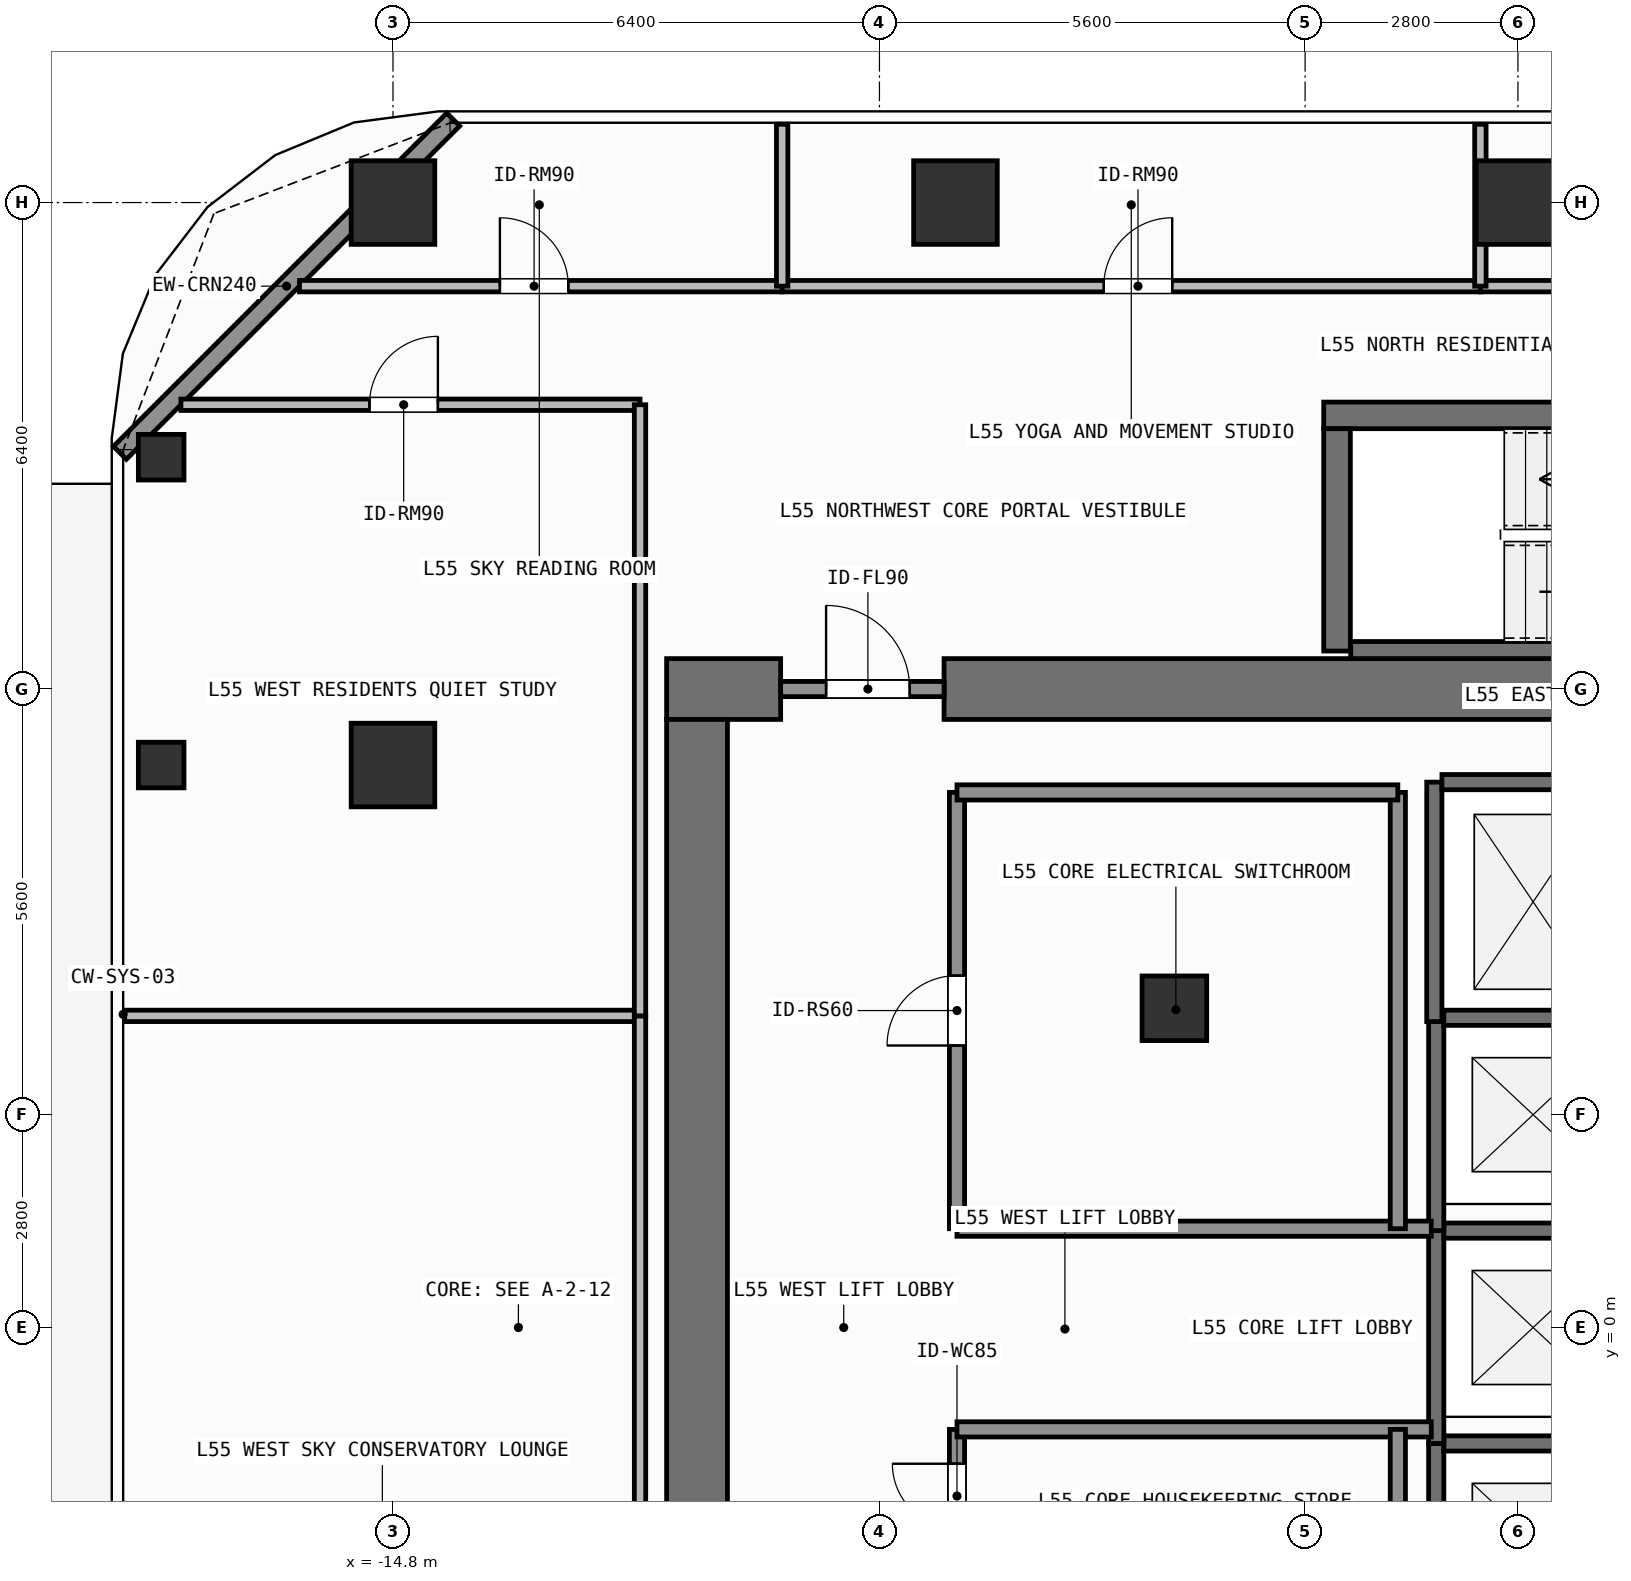
"""IFC4 building model, lengths in metres.
Left out: names, types, materials, properties, quantities, classifications, styles, units other than length and angle.
Written with IfcOpenShell. Run it as: python <this file> out.ifc"""

import sys

from ifc_helpers import new_model, si_unit, direction, frame, frame_2d, origin, origin_2d, place, context, subcontext, project, spatial, rectangle, hollow_rectangle, extrude, element, fill, save


model = new_model("IFC4")
c1 = context("Model", 3, precision=1e-05, world=origin(), true_north=direction((0.0, 1.0)))
c2 = subcontext(c1, "Body", "Model", "MODEL_VIEW")
j1 = project(units=[si_unit("LENGTHUNIT", "METRE"), si_unit("PLANEANGLEUNIT", "RADIAN")], contexts=[c1])
p1 = place(None, origin())
s1 = spatial("IfcSite", under=j1, at=p1, CompositionType="ELEMENT")
p2 = place(p1, origin())
s2 = spatial("IfcBuilding", under=s1, at=p2, CompositionType="ELEMENT")
p3 = place(p2, frame((0.0, 0.0, 223.5)))
s3 = spatial("IfcBuildingStorey", under=s2, at=p3, CompositionType="ELEMENT", Elevation=223.5)
p4 = place(p3, frame((-11.2, 8.4, 0.0), z_axis=(0.0, 0.0, 1.0), x_axis=(1.0, 0.0, 0.0)))
e1 = element("IfcWall", 1, at=p4, inside=s3, PredefinedType="SHEAR", context=c2, shape_type="SweptSolid", body=[
    extrude(rectangle(XDim=1.5, YDim=0.8, at=frame_2d((0.75, 0.0))), origin(), (0.0, 0.0, 1.0), 3.9),
])
p5 = place(p3, frame((-7.55, 8.4, 0.0), z_axis=(0.0, 0.0, 1.0), x_axis=(1.0, 0.0, 0.0)))
e2 = element("IfcWall", 2, at=p5, inside=s3, PredefinedType="SHEAR", context=c2, shape_type="SweptSolid", body=[
    extrude(rectangle(XDim=16.35, YDim=0.8, at=frame_2d((8.175, 0.0))), origin(), (0.0, 0.0, 1.0), 3.9),
])
p6 = place(p3, frame((-10.8, -8.0, 0.0), z_axis=(0.0, 0.0, 1.0), x_axis=(0.0, 1.0, 0.0)))
e3 = element("IfcWall", 3, at=p6, inside=s3, PredefinedType="SHEAR", context=c2, shape_type="SweptSolid", body=[
    extrude(rectangle(XDim=16.0, YDim=0.8, at=frame_2d((8.0, 0.0))), origin(), (0.0, 0.0, 1.0), 3.9),
])
p7 = place(p3, frame((-2.555, 12.0, 0.0), z_axis=(0.0, 0.0, 1.0), x_axis=(1.0, 0.0, 0.0)))
e4 = element("IfcWall", 4, at=p7, inside=s3, PredefinedType="SHEAR", context=c2, shape_type="SweptSolid", body=[
    extrude(rectangle(XDim=7.31, YDim=0.35, at=frame_2d((3.655, 0.0))), origin(), (0.0, 0.0, 1.0), 3.9),
])
p8 = place(p3, frame((-2.2, 8.913, 0.0), z_axis=(0.0, 0.0, 1.0), x_axis=(1.0, 0.0, 0.0)))
e5 = element("IfcWall", 5, at=p8, inside=s3, PredefinedType="SHEAR", context=c2, shape_type="SweptSolid", body=[
    extrude(rectangle(XDim=6.6, YDim=0.225, at=frame_2d((3.3, 0.0))), origin(), (0.0, 0.0, 1.0), 3.9),
])
p9 = place(p3, frame((-2.38, 8.9, 0.0), z_axis=(0.0, 0.0, 1.0), x_axis=(0.0, 1.0, 0.0)))
e6 = element("IfcWall", 6, at=p9, inside=s3, PredefinedType="SHEAR", context=c2, shape_type="SweptSolid", body=[
    extrude(rectangle(XDim=2.925, YDim=0.35, at=frame_2d((1.462, 0.0))), origin(), (0.0, 0.0, 1.0), 3.9),
])
for number, where, z_axis, x_axis in (
    (7, (-14.8, 14.8, 0.0), (0.0, 0.0, 1.0), (1.0, 0.0, 0.0)),
    (8, (-7.4, 14.8, 0.0), (0.0, 0.0, 1.0), (1.0, 0.0, 0.0)),
    (9, (0.0, 14.8, 0.0), (0.0, 0.0, 1.0), (1.0, 0.0, 0.0)),
    (10, (-14.8, 7.4, 0.0), (0.0, 0.0, 1.0), (1.0, 0.0, 0.0)),
):
    element("IfcColumn", number, at=place(p3, frame(where, z_axis=z_axis, x_axis=x_axis)), inside=s3, PredefinedType="COLUMN", context=c2, shape_type="SweptSolid", body=[
        extrude(rectangle(XDim=1.1, YDim=1.1, at=origin_2d()), origin(), (0.0, 0.0, 1.0), 3.9),
    ])
p10 = place(p3, frame((-4.52, 4.2, 0.0), z_axis=(0.0, 0.0, 1.0), x_axis=(1.0, 0.0, 0.0)))
e11 = element("IfcColumn", 11, at=p10, inside=s3, PredefinedType="COLUMN", context=c2, shape_type="SweptSolid", body=[
    extrude(rectangle(XDim=0.85, YDim=0.85, at=origin_2d()), origin(), (0.0, 0.0, 1.0), 3.9),
])
for number, where, z_axis, x_axis in (
    (12, (-17.85, 11.45, 0.0), (0.0, 0.0, 1.0), (1.0, 0.0, 0.0)),
    (13, (-17.85, 7.4, 0.0), (0.0, 0.0, 1.0), (1.0, 0.0, 0.0)),
):
    element("IfcColumn", number, at=place(p3, frame(where, z_axis=z_axis, x_axis=x_axis)), inside=s3, PredefinedType="COLUMN", context=c2, shape_type="SweptSolid", body=[
        extrude(hollow_rectangle(XDim=0.6, YDim=0.6, WallThickness=0.028, at=origin_2d()), origin(), (0.0, 0.0, 1.0), 3.9),
    ])
p11 = place(p3, frame((-18.392, 11.508, 0.0), z_axis=(0.0, 0.0, 1.0), x_axis=(0.707106781187, 0.707106781187, 0.0)))
e14 = element("IfcWall", 14, at=p11, inside=s3, PredefinedType="SOLIDWALL", context=c2, shape_type="SweptSolid", body=[
    extrude(rectangle(XDim=6.201, YDim=0.24, at=frame_2d((3.101, 0.0))), origin(), (0.0, 0.0, 1.0), 3.68),
])
p12 = place(p3, frame((-1.075, -4.275, 0.0), z_axis=(0.0, 0.0, 1.0), x_axis=(0.0, 1.0, 0.0)))
e15 = element("IfcWall", 15, at=p12, inside=s3, PredefinedType="SHEAR", context=c2, shape_type="SweptSolid", body=[
    extrude(rectangle(XDim=2.75, YDim=0.2, at=frame_2d((1.375, 0.0))), origin(), (0.0, 0.0, 1.0), 3.68),
])
p13 = place(p3, frame((-0.975, -1.525, 0.0), z_axis=(0.0, 0.0, 1.0), x_axis=(1.0, 0.0, 0.0)))
e16 = element("IfcWall", 16, at=p13, inside=s3, PredefinedType="SHEAR", context=c2, shape_type="SweptSolid", body=[
    extrude(rectangle(XDim=2.35, YDim=0.2, at=frame_2d((1.175, 0.0))), origin(), (0.0, 0.0, 1.0), 3.68),
])
p14 = place(p3, frame((-1.075, -1.525, 0.0), z_axis=(0.0, 0.0, 1.0), x_axis=(0.0, 1.0, 0.0)))
e17 = element("IfcWall", 17, at=p14, inside=s3, PredefinedType="SHEAR", context=c2, shape_type="SweptSolid", body=[
    extrude(rectangle(XDim=2.8, YDim=0.2, at=frame_2d((1.4, 0.0))), origin(), (0.0, 0.0, 1.0), 3.68),
])
p15 = place(p3, frame((-0.975, 1.275, 0.0), z_axis=(0.0, 0.0, 1.0), x_axis=(1.0, 0.0, 0.0)))
e18 = element("IfcWall", 18, at=p15, inside=s3, PredefinedType="SHEAR", context=c2, shape_type="SweptSolid", body=[
    extrude(rectangle(XDim=2.35, YDim=0.2, at=frame_2d((1.175, 0.0))), origin(), (0.0, 0.0, 1.0), 3.68),
])
p16 = place(p3, frame((-1.075, 1.275, 0.0), z_axis=(0.0, 0.0, 1.0), x_axis=(0.0, 1.0, 0.0)))
e19 = element("IfcWall", 19, at=p16, inside=s3, PredefinedType="SHEAR", context=c2, shape_type="SweptSolid", body=[
    extrude(rectangle(XDim=2.8, YDim=0.2, at=frame_2d((1.4, 0.0))), origin(), (0.0, 0.0, 1.0), 3.68),
])
p17 = place(p3, frame((-0.975, 4.075, 0.0), z_axis=(0.0, 0.0, 1.0), x_axis=(1.0, 0.0, 0.0)))
e20 = element("IfcWall", 20, at=p17, inside=s3, PredefinedType="SHEAR", context=c2, shape_type="SweptSolid", body=[
    extrude(rectangle(XDim=2.35, YDim=0.2, at=frame_2d((1.175, 0.0))), origin(), (0.0, 0.0, 1.0), 3.68),
])
p18 = place(p3, frame((-1.1, 4.025, 0.0), z_axis=(0.0, 0.0, 1.0), x_axis=(0.0, 1.0, 0.0)))
e21 = element("IfcWall", 21, at=p18, inside=s3, PredefinedType="SHEAR", context=c2, shape_type="SweptSolid", body=[
    extrude(rectangle(XDim=3.15, YDim=0.2, at=frame_2d((1.575, 0.0))), origin(), (0.0, 0.0, 1.0), 3.68),
])
p19 = place(p3, frame((-1.0, 7.175, 0.0), z_axis=(0.0, 0.0, 1.0), x_axis=(1.0, 0.0, 0.0)))
e22 = element("IfcWall", 22, at=p19, inside=s3, PredefinedType="SHEAR", context=c2, shape_type="SweptSolid", body=[
    extrude(rectangle(XDim=2.4, YDim=0.2, at=frame_2d((1.2, 0.0))), origin(), (0.0, 0.0, 1.0), 3.68),
])
p20 = place(p3, frame((-9.7, 8.4, 0.0), z_axis=(0.0, 0.0, 1.0), x_axis=(1.0, 0.0, 0.0)))
e23 = element("IfcWall", 23, at=p20, inside=s3, PredefinedType="SOLIDWALL", context=c2, shape_type="SweptSolid", body=[
    extrude(rectangle(XDim=2.15, YDim=0.2, at=frame_2d((1.075, 0.0))), origin(), (0.0, 0.0, 1.0), 2.82),
])
p21 = place(p20, frame((0.598, 0.0, 0.0)))
e24 = element("IfcOpeningElement", 24, at=p21, cuts=e23, PredefinedType="OPENING", context=c2, shape_type="SweptSolid", body=[
    extrude(rectangle(XDim=1.1, YDim=2.15, at=frame_2d((0.55, 1.075))), frame((0.0, 0.11, 0.0), z_axis=(0.0, -1.0, 0.0), x_axis=(1.0, 0.0, 0.0)), (0.0, 0.0, 1.0), 0.22),
])
p22 = place(p3, frame((-7.38, -3.24, 0.0), z_axis=(0.0, 0.0, 1.0), x_axis=(0.0, 1.0, 0.0)))
e25 = element("IfcWall", 25, at=p22, inside=s3, PredefinedType="SOLIDWALL", context=c2, shape_type="SweptSolid", body=[
    extrude(rectangle(XDim=1.9, YDim=0.2, at=frame_2d((0.95, 0.0))), origin(), (0.0, 0.0, 1.0), 3.68),
])
p23 = place(p22, frame((0.598, 0.0, 0.0)))
e26 = element("IfcOpeningElement", 26, at=p23, cuts=e25, PredefinedType="OPENING", context=c2, shape_type="SweptSolid", body=[
    extrude(rectangle(XDim=0.85, YDim=2.1, at=frame_2d((0.425, 1.05))), frame((0.0, 0.11, 0.0), z_axis=(0.0, -1.0, 0.0), x_axis=(1.0, 0.0, 0.0)), (0.0, 0.0, 1.0), 0.22),
])
p24 = place(p3, frame((-7.38, 1.3, 0.0), z_axis=(0.0, 0.0, 1.0), x_axis=(0.0, 1.0, 0.0)))
e27 = element("IfcWall", 27, at=p24, inside=s3, PredefinedType="SOLIDWALL", context=c2, shape_type="SweptSolid", body=[
    extrude(rectangle(XDim=5.74, YDim=0.2, at=frame_2d((2.87, 0.0))), origin(), (0.0, 0.0, 1.0), 3.68),
])
p25 = place(p24, frame((2.41, 0.0, 0.0)))
e28 = element("IfcOpeningElement", 28, at=p25, cuts=e27, PredefinedType="OPENING", context=c2, shape_type="SweptSolid", body=[
    extrude(rectangle(XDim=0.92, YDim=2.1, at=frame_2d((0.46, 1.05))), frame((0.0, 0.11, 0.0), z_axis=(0.0, -1.0, 0.0), x_axis=(1.0, 0.0, 0.0)), (0.0, 0.0, 1.0), 0.22),
])
p26 = place(p3, frame((-16.03, 13.7, 0.0), z_axis=(0.0, 0.0, 1.0), x_axis=(1.0, 0.0, 0.0)))
e29 = element("IfcWall", 29, at=p26, inside=s3, PredefinedType="PARTITIONING", context=c2, shape_type="SweptSolid", body=[
    extrude(rectangle(XDim=6.35, YDim=0.15, at=frame_2d((3.175, 0.0))), origin(), (0.0, 0.0, 1.0), 3.68),
])
p27 = place(p26, frame((2.637, 0.0, 0.0)))
e30 = element("IfcOpeningElement", 30, at=p27, cuts=e29, PredefinedType="OPENING", context=c2, shape_type="SweptSolid", body=[
    extrude(rectangle(XDim=0.9, YDim=2.1, at=frame_2d((0.45, 1.05))), frame((0.0, 0.085, 0.0), z_axis=(0.0, -1.0, 0.0), x_axis=(1.0, 0.0, 0.0)), (0.0, 0.0, 1.0), 0.17),
])
p28 = place(p3, frame((-9.68, 13.7, 0.0), z_axis=(0.0, 0.0, 1.0), x_axis=(1.0, 0.0, 0.0)))
e31 = element("IfcWall", 31, at=p28, inside=s3, PredefinedType="PARTITIONING", context=c2, shape_type="SweptSolid", body=[
    extrude(rectangle(XDim=9.186, YDim=0.15, at=frame_2d((4.593, 0.0))), origin(), (0.0, 0.0, 1.0), 3.68),
])
p29 = place(p28, frame((4.231, 0.0, 0.0)))
e32 = element("IfcOpeningElement", 32, at=p29, cuts=e31, PredefinedType="OPENING", context=c2, shape_type="SweptSolid", body=[
    extrude(rectangle(XDim=0.9, YDim=2.1, at=frame_2d((0.45, 1.05))), frame((0.0, 0.085, 0.0), z_axis=(0.0, -1.0, 0.0), x_axis=(1.0, 0.0, 0.0)), (0.0, 0.0, 1.0), 0.17),
])
p30 = place(p3, frame((-0.494, 13.7, 0.0), z_axis=(0.0, 0.0, 1.0), x_axis=(1.0, 0.0, 0.0)))
e33 = element("IfcWall", 33, at=p30, inside=s3, PredefinedType="PARTITIONING", context=c2, shape_type="SweptSolid", body=[
    extrude(rectangle(XDim=11.583, YDim=0.15, at=frame_2d((5.792, 0.0))), origin(), (0.0, 0.0, 1.0), 3.68),
])
p31 = place(p30, frame((5.342, 0.0, 0.0)))
e34 = element("IfcOpeningElement", 34, at=p31, cuts=e33, PredefinedType="OPENING", context=c2, shape_type="SweptSolid", body=[
    extrude(rectangle(XDim=0.9, YDim=2.1, at=frame_2d((0.45, 1.05))), frame((0.0, 0.085, 0.0), z_axis=(0.0, -1.0, 0.0), x_axis=(1.0, 0.0, 0.0)), (0.0, 0.0, 1.0), 0.17),
])
p32 = place(p3, frame((-17.59, 12.14, 0.0), z_axis=(0.0, 0.0, 1.0), x_axis=(1.0, 0.0, 0.0)))
e35 = element("IfcWall", 35, at=p32, inside=s3, PredefinedType="PARTITIONING", context=c2, shape_type="SweptSolid", body=[
    extrude(rectangle(XDim=6.04, YDim=0.15, at=frame_2d((3.02, 0.0))), origin(), (0.0, 0.0, 1.0), 3.68),
])
p33 = place(p32, frame((2.481, 0.0, 0.0)))
e36 = element("IfcOpeningElement", 36, at=p33, cuts=e35, PredefinedType="OPENING", context=c2, shape_type="SweptSolid", body=[
    extrude(rectangle(XDim=0.9, YDim=2.1, at=frame_2d((0.45, 1.05))), frame((0.0, 0.085, 0.0), z_axis=(0.0, -1.0, 0.0), x_axis=(1.0, 0.0, 0.0)), (0.0, 0.0, 1.0), 0.17),
])
for number, where, z_axis, x_axis in (
    (37, (-7.38, -1.34, 0.0), (0.0, 0.0, 1.0), (1.0, 0.0, 0.0)),
    (38, (-7.38, 1.3, 0.0), (0.0, 0.0, 1.0), (1.0, 0.0, 0.0)),
):
    element("IfcWall", number, at=place(p3, frame(where, z_axis=z_axis, x_axis=x_axis)), inside=s3, PredefinedType="SOLIDWALL", context=c2, shape_type="SweptSolid", body=[
        extrude(rectangle(XDim=6.24, YDim=0.2, at=frame_2d((3.12, 0.0))), origin(), (0.0, 0.0, 1.0), 3.68),
    ])
p34 = place(p3, frame((-1.58, -7.04, 0.0), z_axis=(0.0, 0.0, 1.0), x_axis=(0.0, 1.0, 0.0)))
e39 = element("IfcWall", 39, at=p34, inside=s3, PredefinedType="SOLIDWALL", context=c2, shape_type="SweptSolid", body=[
    extrude(rectangle(XDim=5.7, YDim=0.2, at=frame_2d((2.85, 0.0))), origin(), (0.0, 0.0, 1.0), 3.68),
])
p35 = place(p3, frame((-1.58, 1.3, 0.0), z_axis=(0.0, 0.0, 1.0), x_axis=(0.0, 1.0, 0.0)))
e40 = element("IfcWall", 40, at=p35, inside=s3, PredefinedType="SOLIDWALL", context=c2, shape_type="SweptSolid", body=[
    extrude(rectangle(XDim=5.74, YDim=0.2, at=frame_2d((2.87, 0.0))), origin(), (0.0, 0.0, 1.0), 3.68),
])
p36 = place(p3, frame((-7.38, 7.04, 0.0), z_axis=(0.0, 0.0, 1.0), x_axis=(1.0, 0.0, 0.0)))
e41 = element("IfcWall", 41, at=p36, inside=s3, PredefinedType="SOLIDWALL", context=c2, shape_type="SweptSolid", body=[
    extrude(rectangle(XDim=5.8, YDim=0.2, at=frame_2d((2.9, 0.0))), origin(), (0.0, 0.0, 1.0), 3.68),
])
for number, where, z_axis, x_axis in (
    (42, (-9.68, 13.7, 0.0), (0.0, 0.0, 1.0), (0.0, 1.0, 0.0)),
    (43, (-0.494, 13.7, 0.0), (0.0, 0.0, 1.0), (0.0, 1.0, 0.0)),
):
    element("IfcWall", number, at=place(p3, frame(where, z_axis=z_axis, x_axis=x_axis)), inside=s3, PredefinedType="PARTITIONING", context=c2, shape_type="SweptSolid", body=[
        extrude(rectangle(XDim=2.13, YDim=0.15, at=frame_2d((1.065, 0.0))), origin(), (0.0, 0.0, 1.0), 3.68),
    ])
p37 = place(p3, frame((-18.33, 4.1, 0.0), z_axis=(0.0, 0.0, 1.0), x_axis=(1.0, 0.0, 0.0)))
e44 = element("IfcWall", 44, at=p37, inside=s3, PredefinedType="PARTITIONING", context=c2, shape_type="SweptSolid", body=[
    extrude(rectangle(XDim=6.78, YDim=0.15, at=frame_2d((3.39, 0.0))), origin(), (0.0, 0.0, 1.0), 3.68),
])
p38 = place(p3, frame((-11.55, -12.14, 0.0), z_axis=(0.0, 0.0, 1.0), x_axis=(0.0, 1.0, 0.0)))
e45 = element("IfcWall", 45, at=p38, inside=s3, PredefinedType="PARTITIONING", context=c2, shape_type="SweptSolid", body=[
    extrude(rectangle(XDim=16.24, YDim=0.15, at=frame_2d((8.12, 0.0))), origin(), (0.0, 0.0, 1.0), 3.68),
])
p39 = place(p3, frame((-11.55, 4.1, 0.0), z_axis=(0.0, 0.0, 1.0), x_axis=(0.0, 1.0, 0.0)))
e46 = element("IfcWall", 46, at=p39, inside=s3, PredefinedType="PARTITIONING", context=c2, shape_type="SweptSolid", body=[
    extrude(rectangle(XDim=8.04, YDim=0.15, at=frame_2d((4.02, 0.0))), origin(), (0.0, 0.0, 1.0), 3.68),
])
p40 = place(p21, origin())
e47 = element("IfcDoor", 47, at=p40, inside=s3, OperationType="SINGLE_SWING_LEFT", PredefinedType="DOOR", context=c2, shape_type="SweptSolid", body=[
    extrude(rectangle(XDim=1.1, YDim=2.15, at=frame_2d((0.55, 1.075))), frame((0.0, 0.025, 0.0), z_axis=(0.0, -1.0, 0.0), x_axis=(1.0, 0.0, 0.0)), (0.0, 0.0, 1.0), 0.05),
])
fill(e24, e47)
p41 = place(p23, origin())
e48 = element("IfcDoor", 48, at=p41, inside=s3, OperationType="SINGLE_SWING_RIGHT", PredefinedType="DOOR", context=c2, shape_type="SweptSolid", body=[
    extrude(rectangle(XDim=0.85, YDim=2.1, at=frame_2d((0.425, 1.05))), frame((0.0, 0.025, 0.0), z_axis=(0.0, -1.0, 0.0), x_axis=(1.0, 0.0, 0.0)), (0.0, 0.0, 1.0), 0.05),
])
fill(e26, e48)
p42 = place(p25, origin())
e49 = element("IfcDoor", 49, at=p42, inside=s3, OperationType="SINGLE_SWING_LEFT", PredefinedType="DOOR", context=c2, shape_type="SweptSolid", body=[
    extrude(rectangle(XDim=0.92, YDim=2.1, at=frame_2d((0.46, 1.05))), frame((0.0, 0.025, 0.0), z_axis=(0.0, -1.0, 0.0), x_axis=(1.0, 0.0, 0.0)), (0.0, 0.0, 1.0), 0.05),
])
fill(e28, e49)
p43 = place(p27, origin())
e50 = element("IfcDoor", 50, at=p43, inside=s3, OperationType="SINGLE_SWING_LEFT", PredefinedType="DOOR", context=c2, shape_type="SweptSolid", body=[
    extrude(rectangle(XDim=0.9, YDim=2.1, at=frame_2d((0.45, 1.05))), frame((0.0, 0.025, 0.0), z_axis=(0.0, -1.0, 0.0), x_axis=(1.0, 0.0, 0.0)), (0.0, 0.0, 1.0), 0.05),
])
fill(e30, e50)
p44 = place(p29, origin())
e51 = element("IfcDoor", 51, at=p44, inside=s3, OperationType="SINGLE_SWING_RIGHT", PredefinedType="DOOR", context=c2, shape_type="SweptSolid", body=[
    extrude(rectangle(XDim=0.9, YDim=2.1, at=frame_2d((0.45, 1.05))), frame((0.0, 0.025, 0.0), z_axis=(0.0, -1.0, 0.0), x_axis=(1.0, 0.0, 0.0)), (0.0, 0.0, 1.0), 0.05),
])
fill(e32, e51)
p45 = place(p33, origin())
e52 = element("IfcDoor", 52, at=p45, inside=s3, OperationType="SINGLE_SWING_RIGHT", PredefinedType="DOOR", context=c2, shape_type="SweptSolid", body=[
    extrude(rectangle(XDim=0.9, YDim=2.1, at=frame_2d((0.45, 1.05))), frame((0.0, 0.025, 0.0), z_axis=(0.0, -1.0, 0.0), x_axis=(1.0, 0.0, 0.0)), (0.0, 0.0, 1.0), 0.05),
])
fill(e36, e52)
save(model, sys.argv[1])
